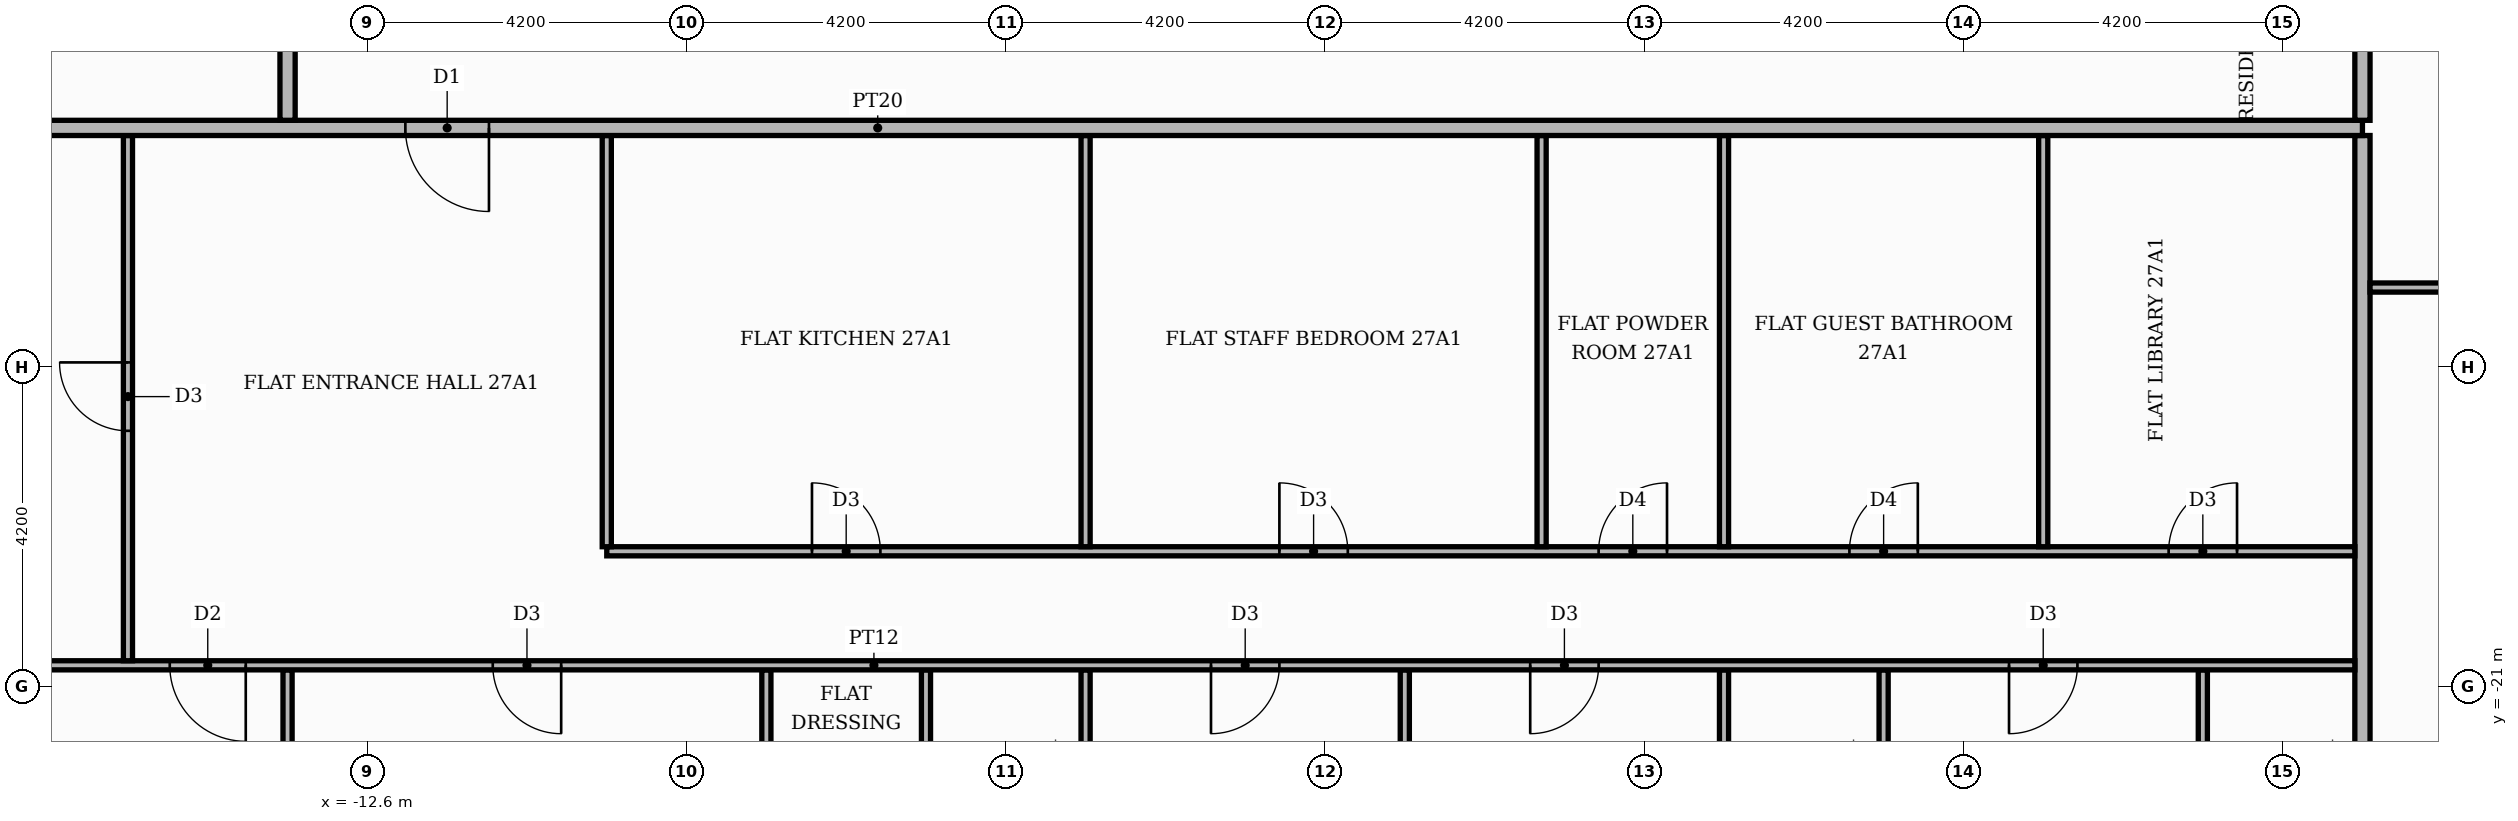
"""IFC4 building model, lengths in metres.
Left out: names, types, materials, properties, quantities, classifications, styles, units other than length and angle.
Written with IfcOpenShell. Run it as: python <this file> out.ifc"""

import sys

from ifc_helpers import new_model, si_unit, direction, frame, frame_2d, origin, place, context, subcontext, project, spatial, rectangle, extrude, element, fill, save


model = new_model("IFC4")
c1 = context("Model", 3, precision=1e-05, world=origin(), true_north=direction((0.0, 1.0)))
c2 = subcontext(c1, "Body", "Model", "MODEL_VIEW")
j1 = project(units=[si_unit("LENGTHUNIT", "METRE"), si_unit("PLANEANGLEUNIT", "RADIAN")], contexts=[c1])
p1 = place(None, origin())
s1 = spatial("IfcSite", under=j1, at=p1, CompositionType="ELEMENT")
p2 = place(p1, origin())
s2 = spatial("IfcBuilding", under=s1, at=p2, CompositionType="ELEMENT")
p3 = place(p2, frame((0.0, 0.0, 114.3)))
s3 = spatial("IfcBuildingStorey", under=s2, at=p3, CompositionType="ELEMENT", Elevation=114.3)
p4 = place(p3, frame((-13.65, -25.42, 0.0), z_axis=(0.0, 0.0, 1.0), x_axis=(0.0, 1.0, 0.0)))
e1 = element("IfcWall", 1, at=p4, inside=s3, PredefinedType="PARTITIONING", context=c2, shape_type="SweptSolid", body=[
    extrude(rectangle(XDim=4.64, YDim=0.12, at=frame_2d((2.32, 0.0))), origin(), (0.0, 0.0, 1.0), 3.48),
])
p5 = place(p3, frame((-7.35, -25.42, 0.0), z_axis=(0.0, 0.0, 1.0), x_axis=(0.0, 1.0, 0.0)))
e2 = element("IfcWall", 2, at=p5, inside=s3, PredefinedType="PARTITIONING", context=c2, shape_type="SweptSolid", body=[
    extrude(rectangle(XDim=4.64, YDim=0.12, at=frame_2d((2.32, 0.0))), origin(), (0.0, 0.0, 1.0), 3.48),
])
p6 = place(p5, frame((1.75, 0.0, 0.0)))
e3 = element("IfcOpeningElement", 3, at=p6, cuts=e2, PredefinedType="OPENING", context=c2, shape_type="SweptSolid", body=[
    extrude(rectangle(XDim=0.9, YDim=2.1, at=frame_2d((0.45, 1.05))), frame((0.0, 0.07, 0.0), z_axis=(0.0, -1.0, 0.0), x_axis=(1.0, 0.0, 0.0)), (0.0, 0.0, 1.0), 0.14),
])
p7 = place(p3, frame((-5.25, -25.42, 0.0), z_axis=(0.0, 0.0, 1.0), x_axis=(0.0, 1.0, 0.0)))
e4 = element("IfcWall", 4, at=p7, inside=s3, PredefinedType="PARTITIONING", context=c2, shape_type="SweptSolid", body=[
    extrude(rectangle(XDim=4.64, YDim=0.12, at=frame_2d((2.32, 0.0))), origin(), (0.0, 0.0, 1.0), 3.48),
])
p8 = place(p7, frame((1.75, 0.0, 0.0)))
e5 = element("IfcOpeningElement", 5, at=p8, cuts=e4, PredefinedType="OPENING", context=c2, shape_type="SweptSolid", body=[
    extrude(rectangle(XDim=0.9, YDim=2.1, at=frame_2d((0.45, 1.05))), frame((0.0, 0.07, 0.0), z_axis=(0.0, -1.0, 0.0), x_axis=(1.0, 0.0, 0.0)), (0.0, 0.0, 1.0), 0.14),
])
for number, where, z_axis, x_axis in (
    (6, (-3.15, -25.42, 0.0), (0.0, 0.0, 1.0), (0.0, 1.0, 0.0)),
    (7, (1.05, -25.42, 0.0), (0.0, 0.0, 1.0), (0.0, 1.0, 0.0)),
):
    element("IfcWall", number, at=place(p3, frame(where, z_axis=z_axis, x_axis=x_axis)), inside=s3, PredefinedType="PARTITIONING", context=c2, shape_type="SweptSolid", body=[
        extrude(rectangle(XDim=4.64, YDim=0.12, at=frame_2d((2.32, 0.0))), origin(), (0.0, 0.0, 1.0), 3.48),
    ])
p9 = place(p3, frame((5.25, -25.42, 0.0), z_axis=(0.0, 0.0, 1.0), x_axis=(0.0, 1.0, 0.0)))
e8 = element("IfcWall", 8, at=p9, inside=s3, PredefinedType="PARTITIONING", context=c2, shape_type="SweptSolid", body=[
    extrude(rectangle(XDim=4.64, YDim=0.12, at=frame_2d((2.32, 0.0))), origin(), (0.0, 0.0, 1.0), 3.48),
])
p10 = place(p9, frame((1.75, 0.0, 0.0)))
e9 = element("IfcOpeningElement", 9, at=p10, cuts=e8, PredefinedType="OPENING", context=c2, shape_type="SweptSolid", body=[
    extrude(rectangle(XDim=0.9, YDim=2.1, at=frame_2d((0.45, 1.05))), frame((0.0, 0.07, 0.0), z_axis=(0.0, -1.0, 0.0), x_axis=(1.0, 0.0, 0.0)), (0.0, 0.0, 1.0), 0.14),
])
p11 = place(p3, frame((7.35, -25.42, 0.0), z_axis=(0.0, 0.0, 1.0), x_axis=(0.0, 1.0, 0.0)))
e10 = element("IfcWall", 10, at=p11, inside=s3, PredefinedType="PARTITIONING", context=c2, shape_type="SweptSolid", body=[
    extrude(rectangle(XDim=4.64, YDim=0.12, at=frame_2d((2.32, 0.0))), origin(), (0.0, 0.0, 1.0), 3.48),
])
p12 = place(p3, frame((11.55, -25.42, 0.0), z_axis=(0.0, 0.0, 1.0), x_axis=(0.0, 1.0, 0.0)))
e11 = element("IfcWall", 11, at=p12, inside=s3, PredefinedType="PARTITIONING", context=c2, shape_type="SweptSolid", body=[
    extrude(rectangle(XDim=4.64, YDim=0.12, at=frame_2d((2.32, 0.0))), origin(), (0.0, 0.0, 1.0), 3.48),
])
p13 = place(p12, frame((1.75, 0.0, 0.0)))
e12 = element("IfcOpeningElement", 12, at=p13, cuts=e11, PredefinedType="OPENING", context=c2, shape_type="SweptSolid", body=[
    extrude(rectangle(XDim=0.9, YDim=2.1, at=frame_2d((0.45, 1.05))), frame((0.0, 0.07, 0.0), z_axis=(0.0, -1.0, 0.0), x_axis=(1.0, 0.0, 0.0)), (0.0, 0.0, 1.0), 0.14),
])
p14 = place(p3, frame((13.65, -25.42, 0.0), z_axis=(0.0, 0.0, 1.0), x_axis=(0.0, 1.0, 0.0)))
e13 = element("IfcWall", 13, at=p14, inside=s3, PredefinedType="PARTITIONING", context=c2, shape_type="SweptSolid", body=[
    extrude(rectangle(XDim=11.67, YDim=0.2, at=frame_2d((5.835, 0.0))), origin(), (0.0, 0.0, 1.0), 3.48),
])
p15 = place(p3, frame((-25.42, -20.72, 0.0), z_axis=(0.0, 0.0, 1.0), x_axis=(1.0, 0.0, 0.0)))
e14 = element("IfcWall", 14, at=p15, inside=s3, PredefinedType="PARTITIONING", context=c2, shape_type="SweptSolid", body=[
    extrude(rectangle(XDim=38.97, YDim=0.12, at=frame_2d((19.485, 0.0))), origin(), (0.0, 0.0, 1.0), 3.48),
])
p16 = place(p15, frame((10.22, 0.0, 0.0)))
e15 = element("IfcOpeningElement", 15, at=p16, cuts=e14, PredefinedType="OPENING", context=c2, shape_type="SweptSolid", body=[
    extrude(rectangle(XDim=1.0, YDim=2.1, at=frame_2d((0.5, 1.05))), frame((0.0, 0.07, 0.0), z_axis=(0.0, -1.0, 0.0), x_axis=(1.0, 0.0, 0.0)), (0.0, 0.0, 1.0), 0.14),
])
p17 = place(p15, frame((14.47, 0.0, 0.0)))
e16 = element("IfcOpeningElement", 16, at=p17, cuts=e14, PredefinedType="OPENING", context=c2, shape_type="SweptSolid", body=[
    extrude(rectangle(XDim=0.9, YDim=2.1, at=frame_2d((0.45, 1.05))), frame((0.0, 0.07, 0.0), z_axis=(0.0, -1.0, 0.0), x_axis=(1.0, 0.0, 0.0)), (0.0, 0.0, 1.0), 0.14),
])
p18 = place(p15, frame((23.92, 0.0, 0.0)))
e17 = element("IfcOpeningElement", 17, at=p18, cuts=e14, PredefinedType="OPENING", context=c2, shape_type="SweptSolid", body=[
    extrude(rectangle(XDim=0.9, YDim=2.1, at=frame_2d((0.45, 1.05))), frame((0.0, 0.07, 0.0), z_axis=(0.0, -1.0, 0.0), x_axis=(1.0, 0.0, 0.0)), (0.0, 0.0, 1.0), 0.14),
])
p19 = place(p15, frame((28.12, 0.0, 0.0)))
e18 = element("IfcOpeningElement", 18, at=p19, cuts=e14, PredefinedType="OPENING", context=c2, shape_type="SweptSolid", body=[
    extrude(rectangle(XDim=0.9, YDim=2.1, at=frame_2d((0.45, 1.05))), frame((0.0, 0.07, 0.0), z_axis=(0.0, -1.0, 0.0), x_axis=(1.0, 0.0, 0.0)), (0.0, 0.0, 1.0), 0.14),
])
p20 = place(p15, frame((34.42, 0.0, 0.0)))
e19 = element("IfcOpeningElement", 19, at=p20, cuts=e14, PredefinedType="OPENING", context=c2, shape_type="SweptSolid", body=[
    extrude(rectangle(XDim=0.9, YDim=2.1, at=frame_2d((0.45, 1.05))), frame((0.0, 0.07, 0.0), z_axis=(0.0, -1.0, 0.0), x_axis=(1.0, 0.0, 0.0)), (0.0, 0.0, 1.0), 0.14),
])
p21 = place(p3, frame((-15.75, -20.66, 0.0), z_axis=(0.0, 0.0, 1.0), x_axis=(0.0, 1.0, 0.0)))
e20 = element("IfcWall", 20, at=p21, inside=s3, PredefinedType="PARTITIONING", context=c2, shape_type="SweptSolid", body=[
    extrude(rectangle(XDim=6.91, YDim=0.12, at=frame_2d((3.455, 0.0))), origin(), (0.0, 0.0, 1.0), 3.48),
])
p22 = place(p21, frame((3.025, 0.0, 0.0)))
e21 = element("IfcOpeningElement", 21, at=p22, cuts=e20, PredefinedType="OPENING", context=c2, shape_type="SweptSolid", body=[
    extrude(rectangle(XDim=0.9, YDim=2.1, at=frame_2d((0.45, 1.05))), frame((0.0, 0.07, 0.0), z_axis=(0.0, -1.0, 0.0), x_axis=(1.0, 0.0, 0.0)), (0.0, 0.0, 1.0), 0.14),
])
p23 = place(p3, frame((-9.45, -19.22, 0.0), z_axis=(0.0, 0.0, 1.0), x_axis=(1.0, 0.0, 0.0)))
e22 = element("IfcWall", 22, at=p23, inside=s3, PredefinedType="PARTITIONING", context=c2, shape_type="SweptSolid", body=[
    extrude(rectangle(XDim=23.0, YDim=0.12, at=frame_2d((11.5, 0.0))), origin(), (0.0, 0.0, 1.0), 3.48),
])
p24 = place(p23, frame((2.7, 0.0, 0.0)))
e23 = element("IfcOpeningElement", 23, at=p24, cuts=e22, PredefinedType="OPENING", context=c2, shape_type="SweptSolid", body=[
    extrude(rectangle(XDim=0.9, YDim=2.1, at=frame_2d((0.45, 1.05))), frame((0.0, 0.07, 0.0), z_axis=(0.0, -1.0, 0.0), x_axis=(1.0, 0.0, 0.0)), (0.0, 0.0, 1.0), 0.14),
])
p25 = place(p23, frame((8.85, 0.0, 0.0)))
e24 = element("IfcOpeningElement", 24, at=p25, cuts=e22, PredefinedType="OPENING", context=c2, shape_type="SweptSolid", body=[
    extrude(rectangle(XDim=0.9, YDim=2.1, at=frame_2d((0.45, 1.05))), frame((0.0, 0.07, 0.0), z_axis=(0.0, -1.0, 0.0), x_axis=(1.0, 0.0, 0.0)), (0.0, 0.0, 1.0), 0.14),
])
p26 = place(p23, frame((13.05, 0.0, 0.0)))
e25 = element("IfcOpeningElement", 25, at=p26, cuts=e22, PredefinedType="OPENING", context=c2, shape_type="SweptSolid", body=[
    extrude(rectangle(XDim=0.9, YDim=2.1, at=frame_2d((0.45, 1.05))), frame((0.0, 0.07, 0.0), z_axis=(0.0, -1.0, 0.0), x_axis=(1.0, 0.0, 0.0)), (0.0, 0.0, 1.0), 0.14),
])
p27 = place(p23, frame((16.35, 0.0, 0.0)))
e26 = element("IfcOpeningElement", 26, at=p27, cuts=e22, PredefinedType="OPENING", context=c2, shape_type="SweptSolid", body=[
    extrude(rectangle(XDim=0.9, YDim=2.1, at=frame_2d((0.45, 1.05))), frame((0.0, 0.07, 0.0), z_axis=(0.0, -1.0, 0.0), x_axis=(1.0, 0.0, 0.0)), (0.0, 0.0, 1.0), 0.14),
])
p28 = place(p23, frame((20.55, 0.0, 0.0)))
e27 = element("IfcOpeningElement", 27, at=p28, cuts=e22, PredefinedType="OPENING", context=c2, shape_type="SweptSolid", body=[
    extrude(rectangle(XDim=0.9, YDim=2.1, at=frame_2d((0.45, 1.05))), frame((0.0, 0.07, 0.0), z_axis=(0.0, -1.0, 0.0), x_axis=(1.0, 0.0, 0.0)), (0.0, 0.0, 1.0), 0.14),
])
for number, where, z_axis, x_axis in (
    (28, (-9.45, -19.16, 0.0), (0.0, 0.0, 1.0), (0.0, 1.0, 0.0)),
    (29, (-3.15, -19.16, 0.0), (0.0, 0.0, 1.0), (0.0, 1.0, 0.0)),
    (30, (2.85, -19.16, 0.0), (0.0, 0.0, 1.0), (0.0, 1.0, 0.0)),
    (31, (5.25, -19.16, 0.0), (0.0, 0.0, 1.0), (0.0, 1.0, 0.0)),
    (32, (9.45, -19.16, 0.0), (0.0, 0.0, 1.0), (0.0, 1.0, 0.0)),
):
    element("IfcWall", number, at=place(p3, frame(where, z_axis=z_axis, x_axis=x_axis)), inside=s3, PredefinedType="PARTITIONING", context=c2, shape_type="SweptSolid", body=[
        extrude(rectangle(XDim=5.41, YDim=0.12, at=frame_2d((2.705, 0.0))), origin(), (0.0, 0.0, 1.0), 3.48),
    ])
p29 = place(p3, frame((13.75, -15.75, 0.0), z_axis=(0.0, 0.0, 1.0), x_axis=(1.0, 0.0, 0.0)))
e33 = element("IfcWall", 33, at=p29, inside=s3, PredefinedType="PARTITIONING", context=c2, shape_type="SweptSolid", body=[
    extrude(rectangle(XDim=6.07, YDim=0.12, at=frame_2d((3.035, 0.0))), origin(), (0.0, 0.0, 1.0), 3.48),
])
p30 = place(p29, frame((2.535, 0.0, 0.0)))
e34 = element("IfcOpeningElement", 34, at=p30, cuts=e33, PredefinedType="OPENING", context=c2, shape_type="SweptSolid", body=[
    extrude(rectangle(XDim=0.9, YDim=2.1, at=frame_2d((0.45, 1.05))), frame((0.0, 0.07, 0.0), z_axis=(0.0, -1.0, 0.0), x_axis=(1.0, 0.0, 0.0)), (0.0, 0.0, 1.0), 0.14),
])
p31 = place(p3, frame((-25.42, -13.65, 0.0), z_axis=(0.0, 0.0, 1.0), x_axis=(1.0, 0.0, 0.0)))
e35 = element("IfcWall", 35, at=p31, inside=s3, PredefinedType="PARTITIONING", context=c2, shape_type="SweptSolid", body=[
    extrude(rectangle(XDim=39.07, YDim=0.2, at=frame_2d((19.535, 0.0))), origin(), (0.0, 0.0, 1.0), 3.48),
])
p32 = place(p31, frame((13.32, 0.0, 0.0)))
e36 = element("IfcOpeningElement", 36, at=p32, cuts=e35, PredefinedType="OPENING", context=c2, shape_type="SweptSolid", body=[
    extrude(rectangle(XDim=1.1, YDim=2.4, at=frame_2d((0.55, 1.2))), frame((0.0, 0.11, 0.0), z_axis=(0.0, -1.0, 0.0), x_axis=(1.0, 0.0, 0.0)), (0.0, 0.0, 1.0), 0.22),
])
p33 = place(p3, frame((-13.65, -13.55, 0.0), z_axis=(0.0, 0.0, 1.0), x_axis=(0.0, 1.0, 0.0)))
e37 = element("IfcWall", 37, at=p33, inside=s3, PredefinedType="PARTITIONING", context=c2, shape_type="SweptSolid", body=[
    extrude(rectangle(XDim=18.7, YDim=0.2, at=frame_2d((9.35, 0.0))), origin(), (0.0, 0.0, 1.0), 3.48),
])
p34 = place(p33, frame((16.15, 0.0, 0.0)))
e38 = element("IfcOpeningElement", 38, at=p34, cuts=e37, PredefinedType="OPENING", context=c2, shape_type="SweptSolid", body=[
    extrude(rectangle(XDim=1.1, YDim=2.4, at=frame_2d((0.55, 1.2))), frame((0.0, 0.11, 0.0), z_axis=(0.0, -1.0, 0.0), x_axis=(1.0, 0.0, 0.0)), (0.0, 0.0, 1.0), 0.22),
])
p35 = place(p3, frame((13.65, -13.55, 0.0), z_axis=(0.0, 0.0, 1.0), x_axis=(0.0, 1.0, 0.0)))
e39 = element("IfcWall", 39, at=p35, inside=s3, PredefinedType="PARTITIONING", context=c2, shape_type="SweptSolid", body=[
    extrude(rectangle(XDim=27.1, YDim=0.2, at=frame_2d((13.55, 0.0))), origin(), (0.0, 0.0, 1.0), 3.48),
])
p36 = place(p35, frame((1.45, 0.0, 0.0)))
e40 = element("IfcOpeningElement", 40, at=p36, cuts=e39, PredefinedType="OPENING", context=c2, shape_type="SweptSolid", body=[
    extrude(rectangle(XDim=1.1, YDim=2.4, at=frame_2d((0.55, 1.2))), frame((0.0, 0.11, 0.0), z_axis=(0.0, -1.0, 0.0), x_axis=(1.0, 0.0, 0.0)), (0.0, 0.0, 1.0), 0.22),
])
p37 = place(p32, frame((1.1, 0.0, 0.0), z_axis=(0.0, 0.0, 1.0), x_axis=(-1.0, 0.0, 0.0)))
e41 = element("IfcDoor", 41, at=p37, inside=s3, OperationType="SINGLE_SWING_RIGHT", PredefinedType="DOOR", context=c2, shape_type="SweptSolid", body=[
    extrude(rectangle(XDim=1.1, YDim=2.4, at=frame_2d((0.55, 1.2))), frame((0.0, 0.025, 0.0), z_axis=(0.0, -1.0, 0.0), x_axis=(1.0, 0.0, 0.0)), (0.0, 0.0, 1.0), 0.05),
])
fill(e36, e41)
p38 = place(p22, origin())
e42 = element("IfcDoor", 42, at=p38, inside=s3, OperationType="SINGLE_SWING_RIGHT", PredefinedType="DOOR", context=c2, shape_type="SweptSolid", body=[
    extrude(rectangle(XDim=0.9, YDim=2.1, at=frame_2d((0.45, 1.05))), frame((0.0, 0.025, 0.0), z_axis=(0.0, -1.0, 0.0), x_axis=(1.0, 0.0, 0.0)), (0.0, 0.0, 1.0), 0.05),
])
fill(e21, e42)
p39 = place(p24, origin())
e43 = element("IfcDoor", 43, at=p39, inside=s3, OperationType="SINGLE_SWING_LEFT", PredefinedType="DOOR", context=c2, shape_type="SweptSolid", body=[
    extrude(rectangle(XDim=0.9, YDim=2.1, at=frame_2d((0.45, 1.05))), frame((0.0, 0.025, 0.0), z_axis=(0.0, -1.0, 0.0), x_axis=(1.0, 0.0, 0.0)), (0.0, 0.0, 1.0), 0.05),
])
fill(e23, e43)
p40 = place(p25, origin())
e44 = element("IfcDoor", 44, at=p40, inside=s3, OperationType="SINGLE_SWING_LEFT", PredefinedType="DOOR", context=c2, shape_type="SweptSolid", body=[
    extrude(rectangle(XDim=0.9, YDim=2.1, at=frame_2d((0.45, 1.05))), frame((0.0, 0.025, 0.0), z_axis=(0.0, -1.0, 0.0), x_axis=(1.0, 0.0, 0.0)), (0.0, 0.0, 1.0), 0.05),
])
fill(e24, e44)
p41 = place(p26, origin())
e45 = element("IfcDoor", 45, at=p41, inside=s3, OperationType="SINGLE_SWING_RIGHT", PredefinedType="DOOR", context=c2, shape_type="SweptSolid", body=[
    extrude(rectangle(XDim=0.9, YDim=2.1, at=frame_2d((0.45, 1.05))), frame((0.0, 0.025, 0.0), z_axis=(0.0, -1.0, 0.0), x_axis=(1.0, 0.0, 0.0)), (0.0, 0.0, 1.0), 0.05),
])
fill(e25, e45)
p42 = place(p27, origin())
e46 = element("IfcDoor", 46, at=p42, inside=s3, OperationType="SINGLE_SWING_RIGHT", PredefinedType="DOOR", context=c2, shape_type="SweptSolid", body=[
    extrude(rectangle(XDim=0.9, YDim=2.1, at=frame_2d((0.45, 1.05))), frame((0.0, 0.025, 0.0), z_axis=(0.0, -1.0, 0.0), x_axis=(1.0, 0.0, 0.0)), (0.0, 0.0, 1.0), 0.05),
])
fill(e26, e46)
p43 = place(p28, origin())
e47 = element("IfcDoor", 47, at=p43, inside=s3, OperationType="SINGLE_SWING_RIGHT", PredefinedType="DOOR", context=c2, shape_type="SweptSolid", body=[
    extrude(rectangle(XDim=0.9, YDim=2.1, at=frame_2d((0.45, 1.05))), frame((0.0, 0.025, 0.0), z_axis=(0.0, -1.0, 0.0), x_axis=(1.0, 0.0, 0.0)), (0.0, 0.0, 1.0), 0.05),
])
fill(e27, e47)
p44 = place(p16, frame((1.0, 0.0, 0.0), z_axis=(0.0, 0.0, 1.0), x_axis=(-1.0, 0.0, 0.0)))
e48 = element("IfcDoor", 48, at=p44, inside=s3, OperationType="SINGLE_SWING_RIGHT", PredefinedType="DOOR", context=c2, shape_type="SweptSolid", body=[
    extrude(rectangle(XDim=1.0, YDim=2.1, at=frame_2d((0.5, 1.05))), frame((0.0, 0.025, 0.0), z_axis=(0.0, -1.0, 0.0), x_axis=(1.0, 0.0, 0.0)), (0.0, 0.0, 1.0), 0.05),
])
fill(e15, e48)
p45 = place(p17, frame((0.9, 0.0, 0.0), z_axis=(0.0, 0.0, 1.0), x_axis=(-1.0, 0.0, 0.0)))
e49 = element("IfcDoor", 49, at=p45, inside=s3, OperationType="SINGLE_SWING_RIGHT", PredefinedType="DOOR", context=c2, shape_type="SweptSolid", body=[
    extrude(rectangle(XDim=0.9, YDim=2.1, at=frame_2d((0.45, 1.05))), frame((0.0, 0.025, 0.0), z_axis=(0.0, -1.0, 0.0), x_axis=(1.0, 0.0, 0.0)), (0.0, 0.0, 1.0), 0.05),
])
fill(e16, e49)
p46 = place(p18, frame((0.9, 0.0, 0.0), z_axis=(0.0, 0.0, 1.0), x_axis=(-1.0, 0.0, 0.0)))
e50 = element("IfcDoor", 50, at=p46, inside=s3, OperationType="SINGLE_SWING_LEFT", PredefinedType="DOOR", context=c2, shape_type="SweptSolid", body=[
    extrude(rectangle(XDim=0.9, YDim=2.1, at=frame_2d((0.45, 1.05))), frame((0.0, 0.025, 0.0), z_axis=(0.0, -1.0, 0.0), x_axis=(1.0, 0.0, 0.0)), (0.0, 0.0, 1.0), 0.05),
])
fill(e17, e50)
p47 = place(p19, frame((0.9, 0.0, 0.0), z_axis=(0.0, 0.0, 1.0), x_axis=(-1.0, 0.0, 0.0)))
e51 = element("IfcDoor", 51, at=p47, inside=s3, OperationType="SINGLE_SWING_LEFT", PredefinedType="DOOR", context=c2, shape_type="SweptSolid", body=[
    extrude(rectangle(XDim=0.9, YDim=2.1, at=frame_2d((0.45, 1.05))), frame((0.0, 0.025, 0.0), z_axis=(0.0, -1.0, 0.0), x_axis=(1.0, 0.0, 0.0)), (0.0, 0.0, 1.0), 0.05),
])
fill(e18, e51)
p48 = place(p20, frame((0.9, 0.0, 0.0), z_axis=(0.0, 0.0, 1.0), x_axis=(-1.0, 0.0, 0.0)))
e52 = element("IfcDoor", 52, at=p48, inside=s3, OperationType="SINGLE_SWING_LEFT", PredefinedType="DOOR", context=c2, shape_type="SweptSolid", body=[
    extrude(rectangle(XDim=0.9, YDim=2.1, at=frame_2d((0.45, 1.05))), frame((0.0, 0.025, 0.0), z_axis=(0.0, -1.0, 0.0), x_axis=(1.0, 0.0, 0.0)), (0.0, 0.0, 1.0), 0.05),
])
fill(e19, e52)
save(model, sys.argv[1])
